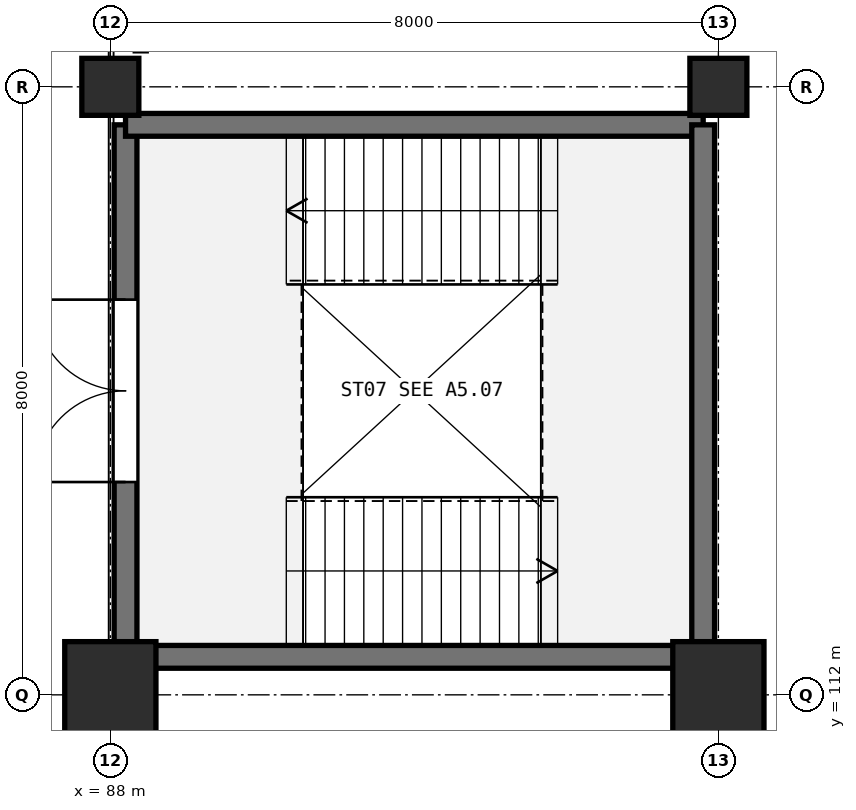
"""IFC4 building model, lengths in metres.
Left out: names, types, materials, properties, quantities, classifications, styles, units other than length and angle.
Written with IfcOpenShell. Run it as: python <this file> out.ifc"""

import sys

from ifc_helpers import new_model, si_unit, direction, frame, frame_2d, origin, origin_2d, place, context, subcontext, project, spatial, rectangle, extrude, element, fill, save


model = new_model("IFC4")
c1 = context("Model", 3, precision=1e-05, world=origin(), true_north=direction((0.0, 1.0)))
c2 = subcontext(c1, "Body", "Model", "MODEL_VIEW")
j1 = project(units=[si_unit("LENGTHUNIT", "METRE"), si_unit("PLANEANGLEUNIT", "RADIAN")], contexts=[c1])
p1 = place(None, origin())
s1 = spatial("IfcSite", under=j1, at=p1, CompositionType="ELEMENT")
p2 = place(p1, origin())
s2 = spatial("IfcBuilding", under=s1, at=p2, CompositionType="ELEMENT")
p3 = place(p2, origin())
s3 = spatial("IfcBuildingStorey", under=s2, at=p3, CompositionType="ELEMENT", Elevation=0.0)
p4 = place(p3, frame((88.0, 112.0, 0.0), z_axis=(0.0, 0.0, 1.0), x_axis=(1.0, 0.0, 0.0)))
e1 = element("IfcColumn", 1, at=p4, inside=s3, PredefinedType="COLUMN", context=c2, shape_type="SweptSolid", body=[
    extrude(rectangle(XDim=1.2, YDim=1.4, at=origin_2d()), origin(), (0.0, 0.0, 1.0), 5.4),
])
p5 = place(p3, frame((88.0, 120.0, 0.0), z_axis=(0.0, 0.0, 1.0), x_axis=(1.0, 0.0, 0.0)))
e2 = element("IfcColumn", 2, at=p5, inside=s3, PredefinedType="COLUMN", context=c2, shape_type="SweptSolid", body=[
    extrude(rectangle(XDim=0.75, YDim=0.75, at=origin_2d()), origin(), (0.0, 0.0, 1.0), 5.4),
])
p6 = place(p3, frame((96.0, 112.0, 0.0), z_axis=(0.0, 0.0, 1.0), x_axis=(1.0, 0.0, 0.0)))
e3 = element("IfcColumn", 3, at=p6, inside=s3, PredefinedType="COLUMN", context=c2, shape_type="SweptSolid", body=[
    extrude(rectangle(XDim=1.2, YDim=1.4, at=origin_2d()), origin(), (0.0, 0.0, 1.0), 5.4),
])
p7 = place(p3, frame((96.0, 120.0, 0.0), z_axis=(0.0, 0.0, 1.0), x_axis=(1.0, 0.0, 0.0)))
e4 = element("IfcColumn", 4, at=p7, inside=s3, PredefinedType="COLUMN", context=c2, shape_type="SweptSolid", body=[
    extrude(rectangle(XDim=0.75, YDim=0.75, at=origin_2d()), origin(), (0.0, 0.0, 1.0), 5.4),
])
p8 = place(p3, frame((95.8, 112.5, 0.0), z_axis=(0.0, 0.0, 1.0), x_axis=(-1.0, 0.0, 0.0)))
e5 = element("IfcWall", 5, at=p8, inside=s3, PredefinedType="SHEAR", context=c2, shape_type="SweptSolid", body=[
    extrude(rectangle(XDim=7.6, YDim=0.3, at=frame_2d((3.8, 0.0))), origin(), (0.0, 0.0, 1.0), 5.08),
])
p9 = place(p3, frame((88.2, 112.5, 0.0), z_axis=(0.0, 0.0, 1.0), x_axis=(0.0, 1.0, 0.0)))
e6 = element("IfcWall", 6, at=p9, inside=s3, PredefinedType="SHEAR", context=c2, shape_type="SweptSolid", body=[
    extrude(rectangle(XDim=7.0, YDim=0.3, at=frame_2d((3.5, 0.0))), origin(), (0.0, 0.0, 1.0), 5.08),
])
p10 = place(p9, frame((2.3, 0.0, 0.0)))
e7 = element("IfcOpeningElement", 7, at=p10, cuts=e6, PredefinedType="OPENING", context=c2, shape_type="SweptSolid", body=[
    extrude(rectangle(XDim=2.4, YDim=2.2, at=frame_2d((1.2, 1.1))), frame((0.0, 0.16, 0.0), z_axis=(0.0, -1.0, 0.0), x_axis=(1.0, 0.0, 0.0)), (0.0, 0.0, 1.0), 0.32),
])
p11 = place(p3, frame((88.2, 119.5, 0.0), z_axis=(0.0, 0.0, 1.0), x_axis=(1.0, 0.0, 0.0)))
e8 = element("IfcWall", 8, at=p11, inside=s3, PredefinedType="SHEAR", context=c2, shape_type="SweptSolid", body=[
    extrude(rectangle(XDim=7.6, YDim=0.3, at=frame_2d((3.8, 0.0))), origin(), (0.0, 0.0, 1.0), 5.08),
])
p12 = place(p3, frame((95.8, 119.5, 0.0), z_axis=(0.0, 0.0, 1.0), x_axis=(0.0, -1.0, 0.0)))
e9 = element("IfcWall", 9, at=p12, inside=s3, PredefinedType="SHEAR", context=c2, shape_type="SweptSolid", body=[
    extrude(rectangle(XDim=7.0, YDim=0.3, at=frame_2d((3.5, 0.0))), origin(), (0.0, 0.0, 1.0), 5.08),
])
p13 = place(p10, origin())
e10 = element("IfcDoor", 10, at=p13, inside=s3, OperationType="DOUBLE_DOOR_SINGLE_SWING", PredefinedType="DOOR", context=c2, shape_type="SweptSolid", body=[
    extrude(rectangle(XDim=2.4, YDim=2.2, at=frame_2d((1.2, 1.1))), frame((0.0, 0.025, 0.0), z_axis=(0.0, -1.0, 0.0), x_axis=(1.0, 0.0, 0.0)), (0.0, 0.0, 1.0), 0.05),
])
fill(e7, e10)
save(model, sys.argv[1])
